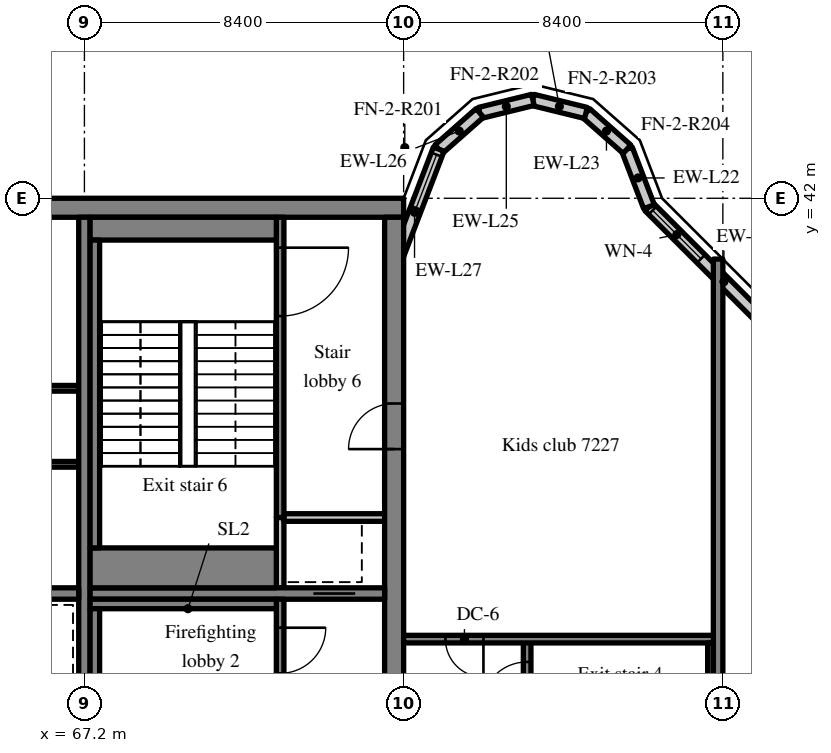
"""IFC4 building model, lengths in metres.
Left out: names, types, materials, properties, quantities, classifications, styles, units other than length and angle.
Written with IfcOpenShell. Run it as: python <this file> out.ifc"""

import sys

from ifc_helpers import new_model, si_unit, direction, frame, frame_2d, origin, place, context, subcontext, project, spatial, rectangle, extrude, source, transform, mapped, element, fill, save


model = new_model("IFC4")
c1 = context("Model", 3, precision=1e-05, world=origin(), true_north=direction((0.0, 1.0)))
c2 = subcontext(c1, "Body", "Model", "MODEL_VIEW")
j1 = project(units=[si_unit("LENGTHUNIT", "METRE"), si_unit("PLANEANGLEUNIT", "RADIAN")], contexts=[c1])
p1 = place(None, origin())
s1 = spatial("IfcSite", under=j1, at=p1, CompositionType="ELEMENT")
p2 = place(p1, origin())
s2 = spatial("IfcBuilding", under=s1, at=p2, CompositionType="ELEMENT")
p3 = place(p2, frame((0.0, 0.0, 301.7)))
s3 = spatial("IfcBuildingStorey", under=s2, at=p3, CompositionType="ELEMENT", Elevation=301.7)
m1 = source(origin(), c2, "Body", "SweptSolid", [
    extrude(rectangle(XDim=50.4, YDim=0.5, at=frame_2d((25.2, 0.0))), origin(), (0.0, 0.0, 1.0), 3.72),
])
p4 = place(p3, frame((25.2, 41.75, 0.0), z_axis=(0.0, 0.0, 1.0), x_axis=(1.0, 0.0, 0.0)))
e1 = element("IfcWall", 1, at=p4, inside=s3, PredefinedType="SHEAR", context=c2, shape_type="MappedRepresentation", body=[
    mapped(m1, transform((0.0, 0.0, 0.0), scale=1.0)),
])
m2 = source(origin(), c2, "Body", "SweptSolid", [
    extrude(rectangle(XDim=19.0, YDim=0.5, at=frame_2d((9.5, 0.0))), origin(), (0.0, 0.0, 1.0), 3.72),
])
p5 = place(p3, frame((75.35, 22.5, 0.0), z_axis=(0.0, 0.0, 1.0), x_axis=(0.0, 1.0, 0.0)))
e2 = element("IfcWall", 2, at=p5, inside=s3, PredefinedType="SHEAR", context=c2, shape_type="MappedRepresentation", body=[
    mapped(m2, transform((0.0, 0.0, 0.0), scale=1.0)),
])
m3 = source(origin(), c2, "Body", "SweptSolid", [
    extrude(rectangle(XDim=1.2, YDim=2.1, at=frame_2d((0.6, 1.05))), frame((0.0, 0.26, 0.0), z_axis=(0.0, -1.0, 0.0), x_axis=(1.0, 0.0, 0.0)), (0.0, 0.0, 1.0), 0.52),
])
p6 = place(p5, frame((12.9, 0.0, 0.0)))
e3 = element("IfcOpeningElement", 3, at=p6, cuts=e2, PredefinedType="OPENING", context=c2, shape_type="MappedRepresentation", body=[
    mapped(m3, transform((0.0, 0.0, 0.0), scale=1.0)),
])
m4 = source(origin(), c2, "Body", "SweptSolid", [
    extrude(rectangle(XDim=19.0, YDim=0.3, at=frame_2d((9.5, 0.0))), origin(), (0.0, 0.0, 1.0), 3.72),
])
p7 = place(p3, frame((67.2, 22.5, 0.0), z_axis=(0.0, 0.0, 1.0), x_axis=(0.0, 1.0, 0.0)))
e4 = element("IfcWall", 4, at=p7, inside=s3, PredefinedType="SHEAR", context=c2, shape_type="MappedRepresentation", body=[
    mapped(m4, transform((0.0, 0.0, 0.0), scale=1.0)),
])
m5 = source(origin(), c2, "Body", "SweptSolid", [
    extrude(rectangle(XDim=16.5, YDim=0.3, at=frame_2d((8.25, 0.0))), origin(), (0.0, 0.0, 1.0), 3.72),
])
p8 = place(p3, frame((50.55, 31.6, 0.0), z_axis=(0.0, 0.0, 1.0), x_axis=(1.0, 0.0, 0.0)))
e5 = element("IfcWall", 5, at=p8, inside=s3, PredefinedType="SHEAR", context=c2, shape_type="MappedRepresentation", body=[
    mapped(m5, transform((0.0, 0.0, 0.0), scale=1.0)),
])
m6 = source(origin(), c2, "Body", "SweptSolid", [
    extrude(rectangle(XDim=1.0, YDim=2.1, at=frame_2d((0.5, 1.05))), frame((0.0, 0.16, 0.0), z_axis=(0.0, -1.0, 0.0), x_axis=(1.0, 0.0, 0.0)), (0.0, 0.0, 1.0), 0.32),
])
p9 = place(p8, frame((0.625, 0.0, 0.0)))
e6 = element("IfcOpeningElement", 6, at=p9, cuts=e5, PredefinedType="OPENING", context=c2, shape_type="MappedRepresentation", body=[
    mapped(m6, transform((0.0, 0.0, 0.0), scale=1.0)),
])
m7 = source(origin(), c2, "Body", "SweptSolid", [
    extrude(rectangle(XDim=7.75, YDim=0.3, at=frame_2d((3.875, 0.0))), origin(), (0.0, 0.0, 1.0), 3.72),
])
p10 = place(p3, frame((67.35, 31.6, 0.0), z_axis=(0.0, 0.0, 1.0), x_axis=(1.0, 0.0, 0.0)))
e7 = element("IfcWall", 7, at=p10, inside=s3, PredefinedType="SHEAR", context=c2, shape_type="MappedRepresentation", body=[
    mapped(m7, transform((0.0, 0.0, 0.0), scale=1.0)),
])
m8 = source(origin(), c2, "Body", "SweptSolid", [
    extrude(rectangle(XDim=1.1, YDim=2.1, at=frame_2d((0.55, 1.05))), frame((0.0, 0.16, 0.0), z_axis=(0.0, -1.0, 0.0), x_axis=(1.0, 0.0, 0.0)), (0.0, 0.0, 1.0), 0.32),
])
p11 = place(p10, frame((5.875, 0.0, 0.0)))
e8 = element("IfcOpeningElement", 8, at=p11, cuts=e7, PredefinedType="OPENING", context=c2, shape_type="MappedRepresentation", body=[
    mapped(m8, transform((0.0, 0.0, 0.0), scale=1.0)),
])
m9 = source(origin(), c2, "Body", "SweptSolid", [
    extrude(rectangle(XDim=18.4, YDim=0.25, at=frame_2d((9.2, 0.0))), origin(), (0.0, 0.0, 1.0), 3.72),
])
p12 = place(p3, frame((83.875, 22.0, 0.0), z_axis=(0.0, 0.0, 1.0), x_axis=(0.0, 1.0, 0.0)))
e9 = element("IfcWall", 9, at=p12, inside=s3, PredefinedType="SHEAR", context=c2, shape_type="MappedRepresentation", body=[
    mapped(m9, transform((0.0, 0.0, 0.0), scale=1.0)),
])
m10 = source(origin(), c2, "Body", "SweptSolid", [
    extrude(rectangle(XDim=5.576, YDim=0.3, at=frame_2d((2.788, 0.0))), origin(), (0.0, 0.0, 1.0), 3.72),
])
p13 = place(p3, frame((86.0, 37.834, 0.0), z_axis=(0.0, 0.0, 1.0), x_axis=(-0.707106781187, 0.707106781187, 0.0)))
e10 = element("IfcWall", 10, at=p13, inside=s3, PredefinedType="SOLIDWALL", context=c2, shape_type="MappedRepresentation", body=[
    mapped(m10, transform((0.0, 0.0, 0.0), scale=1.0)),
])
m11 = source(origin(), c2, "Body", "SweptSolid", [
    extrude(rectangle(XDim=1.8, YDim=1.5, at=frame_2d((0.9, 0.75))), frame((0.0, 0.16, 0.0), z_axis=(0.0, -1.0, 0.0), x_axis=(1.0, 0.0, 0.0)), (0.0, 0.0, 1.0), 0.32),
])
p14 = place(p13, frame((3.641, 0.0, 0.9)))
e11 = element("IfcOpeningElement", 11, at=p14, cuts=e10, PredefinedType="OPENING", context=c2, shape_type="MappedRepresentation", body=[
    mapped(m11, transform((0.0, 0.0, 0.0), scale=1.0)),
])
m12 = source(origin(), c2, "Body", "SweptSolid", [
    extrude(rectangle(XDim=1.622, YDim=0.3, at=frame_2d((0.811, 0.0))), origin(), (0.0, 0.0, 1.0), 3.72),
])
p15 = place(p3, frame((82.057, 41.777, 0.0), z_axis=(0.0, 0.0, 1.0), x_axis=(-0.357778527068, 0.933806471154, 0.0)))
e12 = element("IfcWall", 12, at=p15, inside=s3, PredefinedType="SOLIDWALL", context=c2, shape_type="MappedRepresentation", body=[
    mapped(m12, transform((0.0, 0.0, 0.0), scale=1.0)),
])
m13 = source(origin(), c2, "Body", "SweptSolid", [
    extrude(rectangle(XDim=1.44, YDim=0.3, at=frame_2d((0.72, 0.0))), origin(), (0.0, 0.0, 1.0), 3.72),
])
p16 = place(p3, frame((81.477, 43.292, 0.0), z_axis=(0.0, 0.0, 1.0), x_axis=(-0.74957555648, 0.661918790432, 0.0)))
e13 = element("IfcWall", 13, at=p16, inside=s3, PredefinedType="SOLIDWALL", context=c2, shape_type="MappedRepresentation", body=[
    mapped(m13, transform((0.0, 0.0, 0.0), scale=1.0)),
])
m14 = source(origin(), c2, "Body", "SweptSolid", [
    extrude(rectangle(XDim=1.439, YDim=0.3, at=frame_2d((0.719, 0.0))), origin(), (0.0, 0.0, 1.0), 3.72),
])
for number, where, z_axis, x_axis in (
    (14, (80.397, 44.245, 0.0), (0.0, 0.0, 1.0), (-0.971, 0.238, 0.0)),
    (15, (79.0, 44.588, 0.0), (0.0, 0.0, 1.0), (-0.971, -0.238, 0.0)),
):
    element("IfcWall", number, at=place(p3, frame(where, z_axis=z_axis, x_axis=x_axis)), inside=s3, PredefinedType="SOLIDWALL", context=c2, shape_type="MappedRepresentation", body=[
        mapped(m14, transform((0.0, 0.0, 0.0), scale=1.0)),
    ])
p17 = place(p3, frame((77.603, 44.245, 0.0), z_axis=(0.0, 0.0, 1.0), x_axis=(-0.74957555648, -0.661918790432, 0.0)))
e16 = element("IfcWall", 16, at=p17, inside=s3, PredefinedType="SOLIDWALL", context=c2, shape_type="MappedRepresentation", body=[
    mapped(m13, transform((0.0, 0.0, 0.0), scale=1.0)),
])
m15 = source(origin(), c2, "Body", "SweptSolid", [
    extrude(rectangle(XDim=3.559, YDim=0.3, at=frame_2d((1.78, 0.0))), origin(), (0.0, 0.0, 1.0), 3.72),
])
p18 = place(p3, frame((76.523, 43.292, 0.0), z_axis=(0.0, 0.0, 1.0), x_axis=(-0.35779745313, -0.933799219604, 0.0)))
e17 = element("IfcWall", 17, at=p18, inside=s3, PredefinedType="SOLIDWALL", context=c2, shape_type="MappedRepresentation", body=[
    mapped(m15, transform((0.0, 0.0, 0.0), scale=1.0)),
])
m16 = source(origin(), c2, "Body", "SweptSolid", [
    extrude(rectangle(XDim=1.5, YDim=2.0, at=frame_2d((0.75, 1.0))), frame((0.0, 0.16, 0.0), z_axis=(0.0, -1.0, 0.0), x_axis=(1.0, 0.0, 0.0)), (0.0, 0.0, 1.0), 0.32),
])
p19 = place(p18, frame((0.156, 0.0, 0.9)))
e18 = element("IfcOpeningElement", 18, at=p19, cuts=e17, PredefinedType="OPENING", context=c2, shape_type="MappedRepresentation", body=[
    mapped(m16, transform((0.0, 0.0, 0.0), scale=1.0)),
])
m17 = source(origin(), c2, "Body", "SweptSolid", [
    extrude(rectangle(XDim=14.25, YDim=0.15, at=frame_2d((7.125, 0.0))), origin(), (0.0, 0.0, 1.0), 3.72),
])
p20 = place(p3, frame((67.05, 35.0, 0.0), z_axis=(0.0, 0.0, 1.0), x_axis=(-1.0, 0.0, 0.0)))
e19 = element("IfcWall", 19, at=p20, inside=s3, PredefinedType="PARTITIONING", context=c2, shape_type="MappedRepresentation", body=[
    mapped(m17, transform((0.0, 0.0, 0.0), scale=1.0)),
])
m18 = source(origin(), c2, "Body", "SweptSolid", [
    extrude(rectangle(XDim=0.9, YDim=2.1, at=frame_2d((0.45, 1.05))), frame((0.0, 0.085, 0.0), z_axis=(0.0, -1.0, 0.0), x_axis=(1.0, 0.0, 0.0)), (0.0, 0.0, 1.0), 0.17),
])
p21 = place(p20, frame((6.638, 0.0, 0.0)))
e20 = element("IfcOpeningElement", 20, at=p21, cuts=e19, PredefinedType="OPENING", context=c2, shape_type="MappedRepresentation", body=[
    mapped(m18, transform((0.0, 0.0, 0.0), scale=1.0)),
])
m19 = source(origin(), c2, "Body", "SweptSolid", [
    extrude(rectangle(XDim=16.5, YDim=0.15, at=frame_2d((8.25, 0.0))), origin(), (0.0, 0.0, 1.0), 3.72),
])
p22 = place(p3, frame((67.05, 37.0, 0.0), z_axis=(0.0, 0.0, 1.0), x_axis=(-1.0, 0.0, 0.0)))
e21 = element("IfcWall", 21, at=p22, inside=s3, PredefinedType="PARTITIONING", context=c2, shape_type="MappedRepresentation", body=[
    mapped(m19, transform((0.0, 0.0, 0.0), scale=1.0)),
])
p23 = place(p22, frame((3.263, 0.0, 0.0)))
e22 = element("IfcOpeningElement", 22, at=p23, cuts=e21, PredefinedType="OPENING", context=c2, shape_type="MappedRepresentation", body=[
    mapped(m18, transform((0.0, 0.0, 0.0), scale=1.0)),
])
p24 = place(p22, frame((8.212, 0.0, 0.0)))
e23 = element("IfcOpeningElement", 23, at=p24, cuts=e21, PredefinedType="OPENING", context=c2, shape_type="MappedRepresentation", body=[
    mapped(m18, transform((0.0, 0.0, 0.0), scale=1.0)),
])
p25 = place(p22, frame((11.513, 0.0, 0.0)))
e24 = element("IfcOpeningElement", 24, at=p25, cuts=e21, PredefinedType="OPENING", context=c2, shape_type="MappedRepresentation", body=[
    mapped(m18, transform((0.0, 0.0, 0.0), scale=1.0)),
])
p26 = place(p22, frame((14.813, 0.0, 0.0)))
e25 = element("IfcOpeningElement", 25, at=p26, cuts=e21, PredefinedType="OPENING", context=c2, shape_type="MappedRepresentation", body=[
    mapped(m18, transform((0.0, 0.0, 0.0), scale=1.0)),
])
m20 = source(origin(), c2, "Body", "SweptSolid", [
    extrude(rectangle(XDim=8.95, YDim=0.2, at=frame_2d((4.475, 0.0))), origin(), (0.0, 0.0, 1.0), 3.72),
])
p27 = place(p3, frame((72.35, 22.5, 0.0), z_axis=(0.0, 0.0, 1.0), x_axis=(0.0, 1.0, 0.0)))
e26 = element("IfcWall", 26, at=p27, inside=s3, PredefinedType="SOLIDWALL", context=c2, shape_type="MappedRepresentation", body=[
    mapped(m20, transform((0.0, 0.0, 0.0), scale=1.0)),
])
m21 = source(origin(), c2, "Body", "SweptSolid", [
    extrude(rectangle(XDim=1.2, YDim=2.1, at=frame_2d((0.6, 1.05))), frame((0.0, 0.11, 0.0), z_axis=(0.0, -1.0, 0.0), x_axis=(1.0, 0.0, 0.0)), (0.0, 0.0, 1.0), 0.22),
])
p28 = place(p27, frame((7.0, 0.0, 0.0)))
e27 = element("IfcOpeningElement", 27, at=p28, cuts=e26, PredefinedType="OPENING", context=c2, shape_type="MappedRepresentation", body=[
    mapped(m21, transform((0.0, 0.0, 0.0), scale=1.0)),
])
m22 = source(origin(), c2, "Body", "SweptSolid", [
    extrude(rectangle(XDim=1.85, YDim=0.2, at=frame_2d((0.925, 0.0))), origin(), (0.0, 0.0, 1.0), 3.72),
])
p29 = place(p3, frame((72.35, 31.75, 0.0), z_axis=(0.0, 0.0, 1.0), x_axis=(0.0, 1.0, 0.0)))
e28 = element("IfcWall", 28, at=p29, inside=s3, PredefinedType="SOLIDWALL", context=c2, shape_type="MappedRepresentation", body=[
    mapped(m22, transform((0.0, 0.0, 0.0), scale=1.0)),
])
m23 = source(origin(), c2, "Body", "SweptSolid", [
    extrude(rectangle(XDim=2.65, YDim=0.2, at=frame_2d((1.325, 0.0))), origin(), (0.0, 0.0, 1.0), 3.72),
])
p30 = place(p3, frame((72.45, 33.6, 0.0), z_axis=(0.0, 0.0, 1.0), x_axis=(1.0, 0.0, 0.0)))
e29 = element("IfcWall", 29, at=p30, inside=s3, PredefinedType="SOLIDWALL", context=c2, shape_type="MappedRepresentation", body=[
    mapped(m23, transform((0.0, 0.0, 0.0), scale=1.0)),
])
m24 = source(origin(), c2, "Body", "SweptSolid", [
    extrude(rectangle(XDim=7.9, YDim=0.2, at=frame_2d((3.95, 0.0))), origin(), (0.0, 0.0, 1.0), 3.72),
])
p31 = place(p3, frame((72.35, 33.6, 0.0), z_axis=(0.0, 0.0, 1.0), x_axis=(0.0, 1.0, 0.0)))
e30 = element("IfcWall", 30, at=p31, inside=s3, PredefinedType="SOLIDWALL", context=c2, shape_type="MappedRepresentation", body=[
    mapped(m24, transform((0.0, 0.0, 0.0), scale=1.0)),
])
m25 = source(origin(), c2, "Body", "SweptSolid", [
    extrude(rectangle(XDim=1.8, YDim=2.1, at=frame_2d((0.9, 1.05))), frame((0.0, 0.11, 0.0), z_axis=(0.0, -1.0, 0.0), x_axis=(1.0, 0.0, 0.0)), (0.0, 0.0, 1.0), 0.22),
])
p32 = place(p31, frame((5.3, 0.0, 0.0)))
e31 = element("IfcOpeningElement", 31, at=p32, cuts=e30, PredefinedType="OPENING", context=c2, shape_type="MappedRepresentation", body=[
    mapped(m25, transform((0.0, 0.0, 0.0), scale=1.0)),
])
m26 = source(origin(), c2, "Body", "SweptSolid", [
    extrude(rectangle(XDim=8.3, YDim=0.2, at=frame_2d((4.15, 0.0))), origin(), (0.0, 0.0, 1.0), 3.72),
])
p33 = place(p3, frame((78.85, 22.1, 0.0), z_axis=(0.0, 0.0, 1.0), x_axis=(0.0, 1.0, 0.0)))
e32 = element("IfcWall", 32, at=p33, inside=s3, PredefinedType="SOLIDWALL", context=c2, shape_type="MappedRepresentation", body=[
    mapped(m26, transform((0.0, 0.0, 0.0), scale=1.0)),
])
p34 = place(p33, frame((6.5, 0.0, 0.0)))
e33 = element("IfcOpeningElement", 33, at=p34, cuts=e32, PredefinedType="OPENING", context=c2, shape_type="MappedRepresentation", body=[
    mapped(m21, transform((0.0, 0.0, 0.0), scale=1.0)),
])
m27 = source(origin(), c2, "Body", "SweptSolid", [
    extrude(rectangle(XDim=8.15, YDim=0.2, at=frame_2d((4.075, 0.0))), origin(), (0.0, 0.0, 1.0), 3.72),
])
p35 = place(p3, frame((83.75, 30.4, 0.0), z_axis=(0.0, 0.0, 1.0), x_axis=(-1.0, 0.0, 0.0)))
e34 = element("IfcWall", 34, at=p35, inside=s3, PredefinedType="SOLIDWALL", context=c2, shape_type="MappedRepresentation", body=[
    mapped(m27, transform((0.0, 0.0, 0.0), scale=1.0)),
])
m28 = source(origin(), c2, "Body", "SweptSolid", [
    extrude(rectangle(XDim=1.0, YDim=2.1, at=frame_2d((0.5, 1.05))), frame((0.0, 0.11, 0.0), z_axis=(0.0, -1.0, 0.0), x_axis=(1.0, 0.0, 0.0)), (0.0, 0.0, 1.0), 0.22),
])
p36 = place(p35, frame((6.05, 0.0, 0.0)))
e35 = element("IfcOpeningElement", 35, at=p36, cuts=e34, PredefinedType="OPENING", context=c2, shape_type="MappedRepresentation", body=[
    mapped(m28, transform((0.0, 0.0, 0.0), scale=1.0)),
])
m29 = source(origin(), c2, "Body", "SweptSolid", [
    extrude(rectangle(XDim=4.9, YDim=0.25, at=frame_2d((2.45, 0.0))), origin(), (0.0, 0.0, 1.0), 3.72),
])
p37 = place(p3, frame((67.35, 31.325, 0.0), z_axis=(0.0, 0.0, 1.0), x_axis=(1.0, 0.0, 0.0)))
e36 = element("IfcWall", 36, at=p37, inside=s3, PredefinedType="SOLIDWALL", context=c2, shape_type="MappedRepresentation", body=[
    mapped(m29, transform((0.0, 0.0, 0.0), scale=1.0)),
])
m30 = source(origin(), c2, "Body", "SweptSolid", [
    extrude(rectangle(XDim=8.1, YDim=0.25, at=frame_2d((4.05, 0.0))), origin(), (0.0, 0.0, 1.0), 3.72),
])
p38 = place(p3, frame((67.475, 23.1, 0.0), z_axis=(0.0, 0.0, 1.0), x_axis=(0.0, 1.0, 0.0)))
e37 = element("IfcWall", 37, at=p38, inside=s3, PredefinedType="SOLIDWALL", context=c2, shape_type="MappedRepresentation", body=[
    mapped(m30, transform((0.0, 0.0, 0.0), scale=1.0)),
])
m31 = source(origin(), c2, "Body", "SweptSolid", [
    extrude(rectangle(XDim=4.9, YDim=0.6, at=frame_2d((2.45, 0.0))), origin(), (0.0, 0.0, 1.0), 3.72),
])
p39 = place(p3, frame((67.35, 41.2, 0.0), z_axis=(0.0, 0.0, 1.0), x_axis=(1.0, 0.0, 0.0)))
e38 = element("IfcWall", 38, at=p39, inside=s3, PredefinedType="SOLIDWALL", context=c2, shape_type="MappedRepresentation", body=[
    mapped(m31, transform((0.0, 0.0, 0.0), scale=1.0)),
])
m32 = source(origin(), c2, "Body", "SweptSolid", [
    extrude(rectangle(XDim=4.9, YDim=1.05, at=frame_2d((2.45, 0.0))), origin(), (0.0, 0.0, 1.0), 3.72),
])
p40 = place(p3, frame((67.35, 32.275, 0.0), z_axis=(0.0, 0.0, 1.0), x_axis=(1.0, 0.0, 0.0)))
e39 = element("IfcWall", 39, at=p40, inside=s3, PredefinedType="SOLIDWALL", context=c2, shape_type="MappedRepresentation", body=[
    mapped(m32, transform((0.0, 0.0, 0.0), scale=1.0)),
])
p41 = place(p3, frame((67.475, 32.8, 0.0), z_axis=(0.0, 0.0, 1.0), x_axis=(0.0, 1.0, 0.0)))
e40 = element("IfcWall", 40, at=p41, inside=s3, PredefinedType="SOLIDWALL", context=c2, shape_type="MappedRepresentation", body=[
    mapped(m30, transform((0.0, 0.0, 0.0), scale=1.0)),
])
m33 = source(origin(), c2, "Body", "SweptSolid", [
    extrude(rectangle(XDim=8.1, YDim=0.15, at=frame_2d((4.05, 0.0))), origin(), (0.0, 0.0, 1.0), 3.72),
])
p42 = place(p3, frame((83.675, 22.2, 0.0), z_axis=(0.0, 0.0, 1.0), x_axis=(0.0, 1.0, 0.0)))
e41 = element("IfcWall", 41, at=p42, inside=s3, PredefinedType="SOLIDWALL", context=c2, shape_type="MappedRepresentation", body=[
    mapped(m33, transform((0.0, 0.0, 0.0), scale=1.0)),
])
m34 = source(origin(), c2, "Body", "SweptSolid", [
    extrude(rectangle(XDim=1.8, YDim=1.5, at=frame_2d((0.9, 0.75))), frame((0.0, 0.03, 0.0), z_axis=(0.0, -1.0, 0.0), x_axis=(1.0, 0.0, 0.0)), (0.0, 0.0, 1.0), 0.06),
])
p43 = place(p14, origin())
e42 = element("IfcWindow", 42, at=p43, inside=s3, PartitioningType="SINGLE_PANEL", PredefinedType="WINDOW", context=c2, shape_type="MappedRepresentation", body=[
    mapped(m34, transform((0.0, 0.0, 0.0), scale=1.0)),
])
fill(e11, e42)
m35 = source(origin(), c2, "Body", "SweptSolid", [
    extrude(rectangle(XDim=1.5, YDim=2.0, at=frame_2d((0.75, 1.0))), frame((0.0, 0.03, 0.0), z_axis=(0.0, -1.0, 0.0), x_axis=(1.0, 0.0, 0.0)), (0.0, 0.0, 1.0), 0.06),
])
p44 = place(p19, origin())
e43 = element("IfcWindow", 43, at=p44, inside=s3, PartitioningType="SINGLE_PANEL", PredefinedType="WINDOW", context=c2, shape_type="MappedRepresentation", body=[
    mapped(m35, transform((0.0, 0.0, 0.0), scale=1.0)),
])
fill(e18, e43)
m36 = source(origin(), c2, "Body", "SweptSolid", [
    extrude(rectangle(XDim=1.2, YDim=2.1, at=frame_2d((0.6, 1.05))), frame((0.0, 0.025, 0.0), z_axis=(0.0, -1.0, 0.0), x_axis=(1.0, 0.0, 0.0)), (0.0, 0.0, 1.0), 0.05),
])
p45 = place(p28, origin())
e44 = element("IfcDoor", 44, at=p45, inside=s3, OperationType="SINGLE_SWING_RIGHT", PredefinedType="DOOR", context=c2, shape_type="MappedRepresentation", body=[
    mapped(m36, transform((0.0, 0.0, 0.0), scale=1.0)),
])
fill(e27, e44)
m37 = source(origin(), c2, "Body", "SweptSolid", [
    extrude(rectangle(XDim=1.1, YDim=2.1, at=frame_2d((0.55, 1.05))), frame((0.0, 0.025, 0.0), z_axis=(0.0, -1.0, 0.0), x_axis=(1.0, 0.0, 0.0)), (0.0, 0.0, 1.0), 0.05),
])
p46 = place(p11, origin())
e45 = element("IfcDoor", 45, at=p46, inside=s3, OperationType="SLIDING_TO_LEFT", PredefinedType="DOOR", context=c2, shape_type="MappedRepresentation", body=[
    mapped(m37, transform((0.0, 0.0, 0.0), scale=1.0)),
])
fill(e8, e45)
m38 = source(origin(), c2, "Body", "SweptSolid", [
    extrude(rectangle(XDim=1.8, YDim=2.1, at=frame_2d((0.9, 1.05))), frame((0.0, 0.025, 0.0), z_axis=(0.0, -1.0, 0.0), x_axis=(1.0, 0.0, 0.0)), (0.0, 0.0, 1.0), 0.05),
])
p47 = place(p32, origin())
e46 = element("IfcDoor", 46, at=p47, inside=s3, OperationType="SINGLE_SWING_RIGHT", PredefinedType="DOOR", context=c2, shape_type="MappedRepresentation", body=[
    mapped(m38, transform((0.0, 0.0, 0.0), scale=1.0)),
])
fill(e31, e46)
p48 = place(p6, origin())
e47 = element("IfcDoor", 47, at=p48, inside=s3, OperationType="SINGLE_SWING_LEFT", PredefinedType="DOOR", context=c2, shape_type="MappedRepresentation", body=[
    mapped(m36, transform((0.0, 0.0, 0.0), scale=1.0)),
])
fill(e3, e47)
p49 = place(p34, origin())
e48 = element("IfcDoor", 48, at=p49, inside=s3, OperationType="SINGLE_SWING_LEFT", PredefinedType="DOOR", context=c2, shape_type="MappedRepresentation", body=[
    mapped(m36, transform((0.0, 0.0, 0.0), scale=1.0)),
])
fill(e33, e48)
m39 = source(origin(), c2, "Body", "SweptSolid", [
    extrude(rectangle(XDim=1.0, YDim=2.1, at=frame_2d((0.5, 1.05))), frame((0.0, 0.025, 0.0), z_axis=(0.0, -1.0, 0.0), x_axis=(1.0, 0.0, 0.0)), (0.0, 0.0, 1.0), 0.05),
])
p50 = place(p36, origin())
e49 = element("IfcDoor", 49, at=p50, inside=s3, OperationType="SINGLE_SWING_LEFT", PredefinedType="DOOR", context=c2, shape_type="MappedRepresentation", body=[
    mapped(m39, transform((0.0, 0.0, 0.0), scale=1.0)),
])
fill(e35, e49)
save(model, sys.argv[1])
